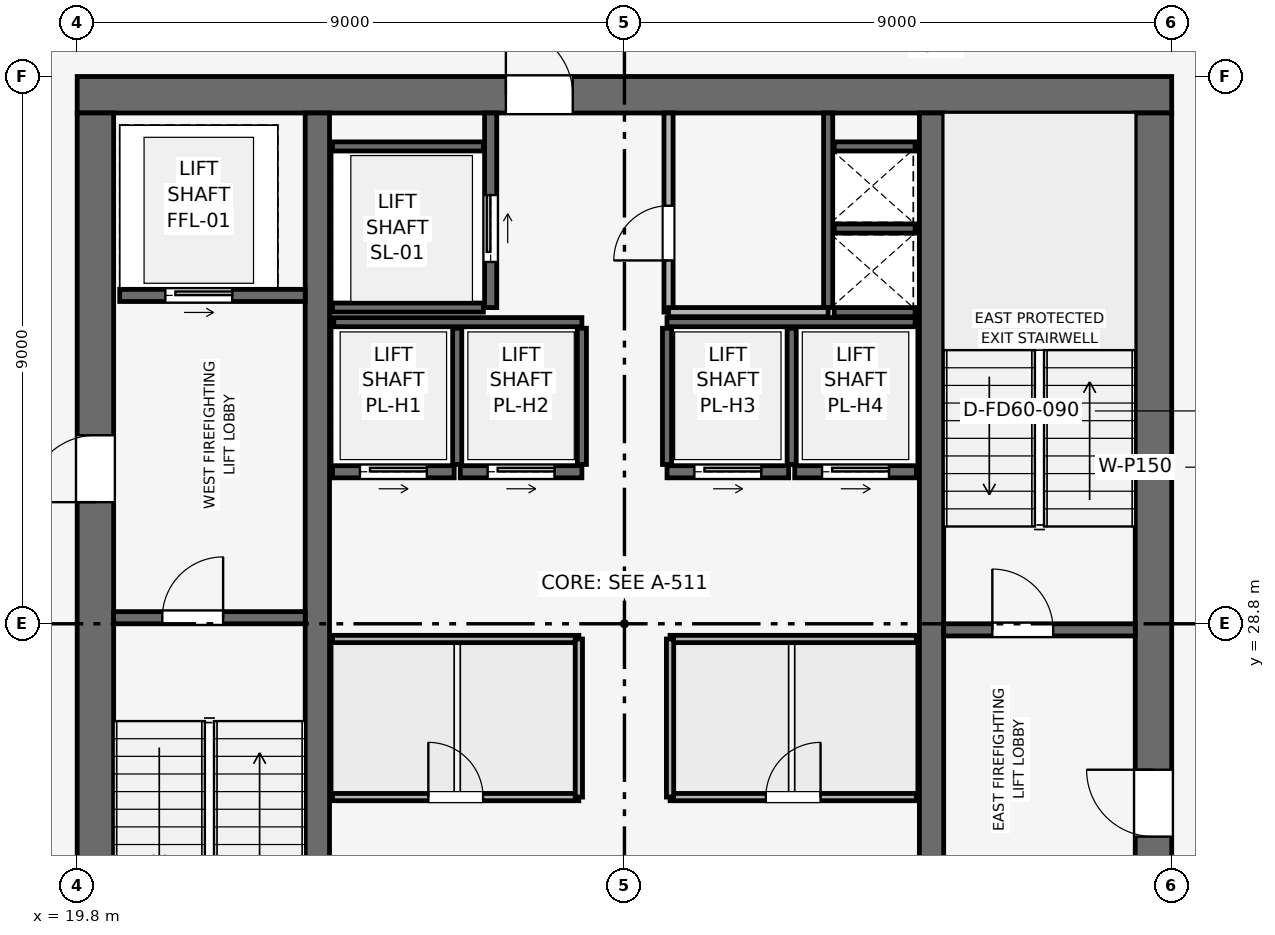
"""IFC4 building model, lengths in metres.
Left out: names, types, materials, properties, quantities, classifications, styles, units other than length and angle.
Written with IfcOpenShell. Run it as: python <this file> out.ifc"""

import sys

from ifc_helpers import new_model, si_unit, direction, frame, frame_2d, origin, place, context, subcontext, project, spatial, rectangle, extrude, element, fill, save


model = new_model("IFC4")
c1 = context("Model", 3, precision=1e-05, world=origin(), true_north=direction((0.0, 1.0)))
c2 = subcontext(c1, "Body", "Model", "MODEL_VIEW")
j1 = project(units=[si_unit("LENGTHUNIT", "METRE"), si_unit("PLANEANGLEUNIT", "RADIAN")], contexts=[c1])
p1 = place(None, origin())
s1 = spatial("IfcSite", under=j1, at=p1, CompositionType="ELEMENT")
p2 = place(p1, origin())
s2 = spatial("IfcBuilding", under=s1, at=p2, CompositionType="ELEMENT")
p3 = place(p2, frame((0.0, 0.0, 310.5)))
s3 = spatial("IfcBuildingStorey", under=s2, at=p3, CompositionType="ELEMENT", Elevation=310.5)
p4 = place(p3, frame((19.8, 37.5, 0.0), z_axis=(0.0, 0.0, 1.0), x_axis=(1.0, 0.0, 0.0)))
e1 = element("IfcWall", 1, at=p4, inside=s3, PredefinedType="SHEAR", context=c2, shape_type="SweptSolid", body=[
    extrude(rectangle(XDim=18.0, YDim=0.6, at=frame_2d((9.0, 0.0))), origin(), (0.0, 0.0, 1.0), 3.75),
])
p5 = place(p4, frame((7.05, 0.0, 0.0)))
e2 = element("IfcOpeningElement", 2, at=p5, cuts=e1, PredefinedType="OPENING", context=c2, shape_type="SweptSolid", body=[
    extrude(rectangle(XDim=1.1, YDim=2.15, at=frame_2d((0.55, 1.075))), frame((0.0, 0.31, 0.0), z_axis=(0.0, -1.0, 0.0), x_axis=(1.0, 0.0, 0.0)), (0.0, 0.0, 1.0), 0.62),
])
p6 = place(p3, frame((20.1, 20.4, 0.0), z_axis=(0.0, 0.0, 1.0), x_axis=(0.0, 1.0, 0.0)))
e3 = element("IfcWall", 3, at=p6, inside=s3, PredefinedType="SHEAR", context=c2, shape_type="SweptSolid", body=[
    extrude(rectangle(XDim=16.8, YDim=0.6, at=frame_2d((8.4, 0.0))), origin(), (0.0, 0.0, 1.0), 3.75),
])
p7 = place(p6, frame((10.4, 0.0, 0.0)))
e4 = element("IfcOpeningElement", 4, at=p7, cuts=e3, PredefinedType="OPENING", context=c2, shape_type="SweptSolid", body=[
    extrude(rectangle(XDim=1.1, YDim=2.15, at=frame_2d((0.55, 1.075))), frame((0.0, 0.31, 0.0), z_axis=(0.0, -1.0, 0.0), x_axis=(1.0, 0.0, 0.0)), (0.0, 0.0, 1.0), 0.62),
])
p8 = place(p3, frame((37.5, 20.4, 0.0), z_axis=(0.0, 0.0, 1.0), x_axis=(0.0, 1.0, 0.0)))
e5 = element("IfcWall", 5, at=p8, inside=s3, PredefinedType="SHEAR", context=c2, shape_type="SweptSolid", body=[
    extrude(rectangle(XDim=16.8, YDim=0.6, at=frame_2d((8.4, 0.0))), origin(), (0.0, 0.0, 1.0), 3.75),
])
p9 = place(p8, frame((4.9, 0.0, 0.0)))
e6 = element("IfcOpeningElement", 6, at=p9, cuts=e5, PredefinedType="OPENING", context=c2, shape_type="SweptSolid", body=[
    extrude(rectangle(XDim=1.1, YDim=2.15, at=frame_2d((0.55, 1.075))), frame((0.0, 0.31, 0.0), z_axis=(0.0, -1.0, 0.0), x_axis=(1.0, 0.0, 0.0)), (0.0, 0.0, 1.0), 0.62),
])
for number, where, z_axis, x_axis in (
    (7, (23.75, 20.4, 0.0), (0.0, 0.0, 1.0), (0.0, 1.0, 0.0)),
    (8, (33.85, 20.4, 0.0), (0.0, 0.0, 1.0), (0.0, 1.0, 0.0)),
):
    element("IfcWall", number, at=place(p3, frame(where, z_axis=z_axis, x_axis=x_axis)), inside=s3, PredefinedType="SHEAR", context=c2, shape_type="SweptSolid", body=[
        extrude(rectangle(XDim=16.8, YDim=0.4, at=frame_2d((8.4, 0.0))), origin(), (0.0, 0.0, 1.0), 3.75),
    ])
p10 = place(p3, frame((20.4, 28.9, 0.0), z_axis=(0.0, 0.0, 1.0), x_axis=(1.0, 0.0, 0.0)))
e9 = element("IfcWall", 9, at=p10, inside=s3, PredefinedType="SHEAR", context=c2, shape_type="SweptSolid", body=[
    extrude(rectangle(XDim=3.15, YDim=0.2, at=frame_2d((1.575, 0.0))), origin(), (0.0, 0.0, 1.0), 3.51),
])
p11 = place(p10, frame((0.8, 0.0, 0.0)))
e10 = element("IfcOpeningElement", 10, at=p11, cuts=e9, PredefinedType="OPENING", context=c2, shape_type="SweptSolid", body=[
    extrude(rectangle(XDim=1.0, YDim=2.1, at=frame_2d((0.5, 1.05))), frame((0.0, 0.11, 0.0), z_axis=(0.0, -1.0, 0.0), x_axis=(1.0, 0.0, 0.0)), (0.0, 0.0, 1.0), 0.22),
])
p12 = place(p3, frame((34.05, 28.7, 0.0), z_axis=(0.0, 0.0, 1.0), x_axis=(1.0, 0.0, 0.0)))
e11 = element("IfcWall", 11, at=p12, inside=s3, PredefinedType="SHEAR", context=c2, shape_type="SweptSolid", body=[
    extrude(rectangle(XDim=3.15, YDim=0.2, at=frame_2d((1.575, 0.0))), origin(), (0.0, 0.0, 1.0), 3.51),
])
p13 = place(p12, frame((0.8, 0.0, 0.0)))
e12 = element("IfcOpeningElement", 12, at=p13, cuts=e11, PredefinedType="OPENING", context=c2, shape_type="SweptSolid", body=[
    extrude(rectangle(XDim=1.0, YDim=2.1, at=frame_2d((0.5, 1.05))), frame((0.0, 0.11, 0.0), z_axis=(0.0, -1.0, 0.0), x_axis=(1.0, 0.0, 0.0)), (0.0, 0.0, 1.0), 0.22),
])
p14 = place(p3, frame((32.15, 34.0, 0.0), z_axis=(0.0, 0.0, 1.0), x_axis=(0.0, 1.0, 0.0)))
e13 = element("IfcWall", 13, at=p14, inside=s3, PredefinedType="SHEAR", context=c2, shape_type="SweptSolid", body=[
    extrude(rectangle(XDim=3.2, YDim=0.15, at=frame_2d((1.6, 0.0))), origin(), (0.0, 0.0, 1.0), 3.51),
])
for number, where, z_axis, x_axis in (
    (14, (32.25, 33.925, 0.0), (0.0, 0.0, 1.0), (1.0, 0.0, 0.0)),
    (15, (32.25, 35.3, 0.0), (0.0, 0.0, 1.0), (1.0, 0.0, 0.0)),
):
    element("IfcWall", number, at=place(p3, frame(where, z_axis=z_axis, x_axis=x_axis)), inside=s3, PredefinedType="SHEAR", context=c2, shape_type="SweptSolid", body=[
        extrude(rectangle(XDim=1.33, YDim=0.15, at=frame_2d((0.665, 0.0))), origin(), (0.0, 0.0, 1.0), 3.51),
    ])
p15 = place(p3, frame((20.5, 34.2, 0.0), z_axis=(0.0, 0.0, 1.0), x_axis=(1.0, 0.0, 0.0)))
e16 = element("IfcWall", 16, at=p15, inside=s3, PredefinedType="SHEAR", context=c2, shape_type="SweptSolid", body=[
    extrude(rectangle(XDim=3.05, YDim=0.2, at=frame_2d((1.525, 0.0))), origin(), (0.0, 0.0, 1.0), 3.51),
])
p16 = place(p15, frame((0.75, 0.0, 0.0)))
e17 = element("IfcOpeningElement", 17, at=p16, cuts=e16, PredefinedType="OPENING", context=c2, shape_type="SweptSolid", body=[
    extrude(rectangle(XDim=1.1, YDim=2.15, at=frame_2d((0.55, 1.075))), frame((0.0, 0.11, 0.0), z_axis=(0.0, -1.0, 0.0), x_axis=(1.0, 0.0, 0.0)), (0.0, 0.0, 1.0), 0.22),
])
p17 = place(p3, frame((26.6, 34.0, 0.0), z_axis=(0.0, 0.0, 1.0), x_axis=(0.0, 1.0, 0.0)))
e18 = element("IfcWall", 18, at=p17, inside=s3, PredefinedType="SHEAR", context=c2, shape_type="SweptSolid", body=[
    extrude(rectangle(XDim=3.2, YDim=0.2, at=frame_2d((1.6, 0.0))), origin(), (0.0, 0.0, 1.0), 3.51),
])
p18 = place(p17, frame((0.75, 0.0, 0.0)))
e19 = element("IfcOpeningElement", 19, at=p18, cuts=e18, PredefinedType="OPENING", context=c2, shape_type="SweptSolid", body=[
    extrude(rectangle(XDim=1.1, YDim=2.15, at=frame_2d((0.55, 1.075))), frame((0.0, 0.11, 0.0), z_axis=(0.0, -1.0, 0.0), x_axis=(1.0, 0.0, 0.0)), (0.0, 0.0, 1.0), 0.22),
])
for number, where, z_axis, x_axis in (
    (20, (24.0, 34.0, 0.0), (0.0, 0.0, 1.0), (1.0, 0.0, 0.0)),
    (21, (24.0, 36.65, 0.0), (0.0, 0.0, 1.0), (1.0, 0.0, 0.0)),
):
    element("IfcWall", number, at=place(p3, frame(where, z_axis=z_axis, x_axis=x_axis)), inside=s3, PredefinedType="SHEAR", context=c2, shape_type="SweptSolid", body=[
        extrude(rectangle(XDim=2.48, YDim=0.15, at=frame_2d((1.24, 0.0))), origin(), (0.0, 0.0, 1.0), 3.51),
    ])
p19 = place(p3, frame((24.0, 31.3, 0.0), z_axis=(0.0, 0.0, 1.0), x_axis=(1.0, 0.0, 0.0)))
e22 = element("IfcWall", 22, at=p19, inside=s3, PredefinedType="SHEAR", context=c2, shape_type="SweptSolid", body=[
    extrude(rectangle(XDim=2.0, YDim=0.2, at=frame_2d((1.0, 0.0))), origin(), (0.0, 0.0, 1.0), 3.51),
])
p20 = place(p19, frame((0.45, 0.0, 0.0)))
e23 = element("IfcOpeningElement", 23, at=p20, cuts=e22, PredefinedType="OPENING", context=c2, shape_type="SweptSolid", body=[
    extrude(rectangle(XDim=1.1, YDim=2.15, at=frame_2d((0.55, 1.075))), frame((0.0, 0.11, 0.0), z_axis=(0.0, -1.0, 0.0), x_axis=(1.0, 0.0, 0.0)), (0.0, 0.0, 1.0), 0.22),
])
p21 = place(p3, frame((26.1, 31.3, 0.0), z_axis=(0.0, 0.0, 1.0), x_axis=(1.0, 0.0, 0.0)))
e24 = element("IfcWall", 24, at=p21, inside=s3, PredefinedType="SHEAR", context=c2, shape_type="SweptSolid", body=[
    extrude(rectangle(XDim=2.0, YDim=0.2, at=frame_2d((1.0, 0.0))), origin(), (0.0, 0.0, 1.0), 3.51),
])
p22 = place(p21, frame((0.45, 0.0, 0.0)))
e25 = element("IfcOpeningElement", 25, at=p22, cuts=e24, PredefinedType="OPENING", context=c2, shape_type="SweptSolid", body=[
    extrude(rectangle(XDim=1.1, YDim=2.15, at=frame_2d((0.55, 1.075))), frame((0.0, 0.11, 0.0), z_axis=(0.0, -1.0, 0.0), x_axis=(1.0, 0.0, 0.0)), (0.0, 0.0, 1.0), 0.22),
])
p23 = place(p3, frame((29.5, 31.3, 0.0), z_axis=(0.0, 0.0, 1.0), x_axis=(1.0, 0.0, 0.0)))
e26 = element("IfcWall", 26, at=p23, inside=s3, PredefinedType="SHEAR", context=c2, shape_type="SweptSolid", body=[
    extrude(rectangle(XDim=2.0, YDim=0.2, at=frame_2d((1.0, 0.0))), origin(), (0.0, 0.0, 1.0), 3.51),
])
p24 = place(p23, frame((0.45, 0.0, 0.0)))
e27 = element("IfcOpeningElement", 27, at=p24, cuts=e26, PredefinedType="OPENING", context=c2, shape_type="SweptSolid", body=[
    extrude(rectangle(XDim=1.1, YDim=2.15, at=frame_2d((0.55, 1.075))), frame((0.0, 0.11, 0.0), z_axis=(0.0, -1.0, 0.0), x_axis=(1.0, 0.0, 0.0)), (0.0, 0.0, 1.0), 0.22),
])
p25 = place(p3, frame((31.6, 31.3, 0.0), z_axis=(0.0, 0.0, 1.0), x_axis=(1.0, 0.0, 0.0)))
e28 = element("IfcWall", 28, at=p25, inside=s3, PredefinedType="SHEAR", context=c2, shape_type="SweptSolid", body=[
    extrude(rectangle(XDim=2.0, YDim=0.2, at=frame_2d((1.0, 0.0))), origin(), (0.0, 0.0, 1.0), 3.51),
])
p26 = place(p25, frame((0.45, 0.0, 0.0)))
e29 = element("IfcOpeningElement", 29, at=p26, cuts=e28, PredefinedType="OPENING", context=c2, shape_type="SweptSolid", body=[
    extrude(rectangle(XDim=1.1, YDim=2.15, at=frame_2d((0.55, 1.075))), frame((0.0, 0.11, 0.0), z_axis=(0.0, -1.0, 0.0), x_axis=(1.0, 0.0, 0.0)), (0.0, 0.0, 1.0), 0.22),
])
p27 = place(p3, frame((32.25, 36.65, 0.0), z_axis=(0.0, 0.0, 1.0), x_axis=(1.0, 0.0, 0.0)))
e30 = element("IfcWall", 30, at=p27, inside=s3, PredefinedType="SHEAR", context=c2, shape_type="SweptSolid", body=[
    extrude(rectangle(XDim=1.33, YDim=0.15, at=frame_2d((0.665, 0.0))), origin(), (0.0, 0.0, 1.0), 3.51),
])
for number, where, z_axis, x_axis in (
    (31, (24.02, 33.76, 0.0), (0.0, 0.0, 1.0), (1.0, 0.0, 0.0)),
    (32, (29.5, 33.76, 0.0), (0.0, 0.0, 1.0), (1.0, 0.0, 0.0)),
):
    element("IfcWall", number, at=place(p3, frame(where, z_axis=z_axis, x_axis=x_axis)), inside=s3, PredefinedType="SHEAR", context=c2, shape_type="SweptSolid", body=[
        extrude(rectangle(XDim=4.08, YDim=0.15, at=frame_2d((2.04, 0.0))), origin(), (0.0, 0.0, 1.0), 3.51),
    ])
for number, where, z_axis, x_axis in (
    (33, (26.05, 31.42, 0.0), (0.0, 0.0, 1.0), (0.0, 1.0, 0.0)),
    (34, (28.1, 31.42, 0.0), (0.0, 0.0, 1.0), (0.0, 1.0, 0.0)),
    (35, (29.5, 31.42, 0.0), (0.0, 0.0, 1.0), (0.0, 1.0, 0.0)),
    (36, (31.55, 31.42, 0.0), (0.0, 0.0, 1.0), (0.0, 1.0, 0.0)),
):
    element("IfcWall", number, at=place(p3, frame(where, z_axis=z_axis, x_axis=x_axis)), inside=s3, PredefinedType="SHEAR", context=c2, shape_type="SweptSolid", body=[
        extrude(rectangle(XDim=2.24, YDim=0.15, at=frame_2d((1.12, 0.0))), origin(), (0.0, 0.0, 1.0), 3.51),
    ])
p28 = place(p3, frame((29.525, 33.925, 0.0), z_axis=(0.0, 0.0, 1.0), x_axis=(0.0, 1.0, 0.0)))
e37 = element("IfcWall", 37, at=p28, inside=s3, PredefinedType="PARTITIONING", context=c2, shape_type="SweptSolid", body=[
    extrude(rectangle(XDim=3.275, YDim=0.15, at=frame_2d((1.637, 0.0))), origin(), (0.0, 0.0, 1.0), 3.51),
])
p29 = place(p28, frame((0.85, 0.0, 0.0)))
e38 = element("IfcOpeningElement", 38, at=p29, cuts=e37, PredefinedType="OPENING", context=c2, shape_type="SweptSolid", body=[
    extrude(rectangle(XDim=0.9, YDim=2.1, at=frame_2d((0.45, 1.05))), frame((0.0, 0.085, 0.0), z_axis=(0.0, -1.0, 0.0), x_axis=(1.0, 0.0, 0.0)), (0.0, 0.0, 1.0), 0.17),
])
p30 = place(p3, frame((29.525, 33.925, 0.0), z_axis=(0.0, 0.0, 1.0), x_axis=(1.0, 0.0, 0.0)))
e39 = element("IfcWall", 39, at=p30, inside=s3, PredefinedType="PARTITIONING", context=c2, shape_type="SweptSolid", body=[
    extrude(rectangle(XDim=2.625, YDim=0.15, at=frame_2d((1.312, 0.0))), origin(), (0.0, 0.0, 1.0), 3.51),
])
p31 = place(p3, frame((24.0, 25.95, 0.0), z_axis=(0.0, 0.0, 1.0), x_axis=(1.0, 0.0, 0.0)))
e40 = element("IfcWall", 40, at=p31, inside=s3, PredefinedType="PARTITIONING", context=c2, shape_type="SweptSolid", body=[
    extrude(rectangle(XDim=4.05, YDim=0.12, at=frame_2d((2.025, 0.0))), origin(), (0.0, 0.0, 1.0), 3.51),
])
p32 = place(p31, frame((1.575, 0.0, 0.0)))
e41 = element("IfcOpeningElement", 41, at=p32, cuts=e40, PredefinedType="OPENING", context=c2, shape_type="SweptSolid", body=[
    extrude(rectangle(XDim=0.9, YDim=2.1, at=frame_2d((0.45, 1.05))), frame((0.0, 0.07, 0.0), z_axis=(0.0, -1.0, 0.0), x_axis=(1.0, 0.0, 0.0)), (0.0, 0.0, 1.0), 0.14),
])
p33 = place(p3, frame((24.0, 28.55, 0.0), z_axis=(0.0, 0.0, 1.0), x_axis=(1.0, 0.0, 0.0)))
e42 = element("IfcWall", 42, at=p33, inside=s3, PredefinedType="PARTITIONING", context=c2, shape_type="SweptSolid", body=[
    extrude(rectangle(XDim=4.05, YDim=0.12, at=frame_2d((2.025, 0.0))), origin(), (0.0, 0.0, 1.0), 3.51),
])
p34 = place(p3, frame((28.05, 25.95, 0.0), z_axis=(0.0, 0.0, 1.0), x_axis=(0.0, 1.0, 0.0)))
e43 = element("IfcWall", 43, at=p34, inside=s3, PredefinedType="PARTITIONING", context=c2, shape_type="SweptSolid", body=[
    extrude(rectangle(XDim=2.6, YDim=0.12, at=frame_2d((1.3, 0.0))), origin(), (0.0, 0.0, 1.0), 3.51),
])
p35 = place(p3, frame((29.55, 25.95, 0.0), z_axis=(0.0, 0.0, 1.0), x_axis=(1.0, 0.0, 0.0)))
e44 = element("IfcWall", 44, at=p35, inside=s3, PredefinedType="PARTITIONING", context=c2, shape_type="SweptSolid", body=[
    extrude(rectangle(XDim=4.05, YDim=0.12, at=frame_2d((2.025, 0.0))), origin(), (0.0, 0.0, 1.0), 3.51),
])
p36 = place(p35, frame((1.575, 0.0, 0.0)))
e45 = element("IfcOpeningElement", 45, at=p36, cuts=e44, PredefinedType="OPENING", context=c2, shape_type="SweptSolid", body=[
    extrude(rectangle(XDim=0.9, YDim=2.1, at=frame_2d((0.45, 1.05))), frame((0.0, 0.07, 0.0), z_axis=(0.0, -1.0, 0.0), x_axis=(1.0, 0.0, 0.0)), (0.0, 0.0, 1.0), 0.14),
])
p37 = place(p3, frame((29.55, 28.55, 0.0), z_axis=(0.0, 0.0, 1.0), x_axis=(1.0, 0.0, 0.0)))
e46 = element("IfcWall", 46, at=p37, inside=s3, PredefinedType="PARTITIONING", context=c2, shape_type="SweptSolid", body=[
    extrude(rectangle(XDim=4.05, YDim=0.12, at=frame_2d((2.025, 0.0))), origin(), (0.0, 0.0, 1.0), 3.51),
])
p38 = place(p3, frame((29.55, 25.95, 0.0), z_axis=(0.0, 0.0, 1.0), x_axis=(0.0, 1.0, 0.0)))
e47 = element("IfcWall", 47, at=p38, inside=s3, PredefinedType="PARTITIONING", context=c2, shape_type="SweptSolid", body=[
    extrude(rectangle(XDim=2.6, YDim=0.12, at=frame_2d((1.3, 0.0))), origin(), (0.0, 0.0, 1.0), 3.51),
])
p39 = place(p11, origin())
e48 = element("IfcDoor", 48, at=p39, inside=s3, OperationType="SINGLE_SWING_RIGHT", PredefinedType="DOOR", context=c2, shape_type="SweptSolid", body=[
    extrude(rectangle(XDim=1.0, YDim=2.1, at=frame_2d((0.5, 1.05))), frame((0.0, 0.025, 0.0), z_axis=(0.0, -1.0, 0.0), x_axis=(1.0, 0.0, 0.0)), (0.0, 0.0, 1.0), 0.05),
])
fill(e10, e48)
p40 = place(p13, origin())
e49 = element("IfcDoor", 49, at=p40, inside=s3, OperationType="SINGLE_SWING_LEFT", PredefinedType="DOOR", context=c2, shape_type="SweptSolid", body=[
    extrude(rectangle(XDim=1.0, YDim=2.1, at=frame_2d((0.5, 1.05))), frame((0.0, 0.025, 0.0), z_axis=(0.0, -1.0, 0.0), x_axis=(1.0, 0.0, 0.0)), (0.0, 0.0, 1.0), 0.05),
])
fill(e12, e49)
p41 = place(p16, origin())
e50 = element("IfcDoor", 50, at=p41, inside=s3, OperationType="SLIDING_TO_RIGHT", PredefinedType="DOOR", context=c2, shape_type="SweptSolid", body=[
    extrude(rectangle(XDim=1.1, YDim=2.15, at=frame_2d((0.55, 1.075))), frame((0.0, 0.025, 0.0), z_axis=(0.0, -1.0, 0.0), x_axis=(1.0, 0.0, 0.0)), (0.0, 0.0, 1.0), 0.05),
])
fill(e17, e50)
p42 = place(p18, origin())
e51 = element("IfcDoor", 51, at=p42, inside=s3, OperationType="SLIDING_TO_RIGHT", PredefinedType="DOOR", context=c2, shape_type="SweptSolid", body=[
    extrude(rectangle(XDim=1.1, YDim=2.15, at=frame_2d((0.55, 1.075))), frame((0.0, 0.025, 0.0), z_axis=(0.0, -1.0, 0.0), x_axis=(1.0, 0.0, 0.0)), (0.0, 0.0, 1.0), 0.05),
])
fill(e19, e51)
p43 = place(p20, origin())
e52 = element("IfcDoor", 52, at=p43, inside=s3, OperationType="SLIDING_TO_RIGHT", PredefinedType="DOOR", context=c2, shape_type="SweptSolid", body=[
    extrude(rectangle(XDim=1.1, YDim=2.15, at=frame_2d((0.55, 1.075))), frame((0.0, 0.025, 0.0), z_axis=(0.0, -1.0, 0.0), x_axis=(1.0, 0.0, 0.0)), (0.0, 0.0, 1.0), 0.05),
])
fill(e23, e52)
p44 = place(p22, origin())
e53 = element("IfcDoor", 53, at=p44, inside=s3, OperationType="SLIDING_TO_RIGHT", PredefinedType="DOOR", context=c2, shape_type="SweptSolid", body=[
    extrude(rectangle(XDim=1.1, YDim=2.15, at=frame_2d((0.55, 1.075))), frame((0.0, 0.025, 0.0), z_axis=(0.0, -1.0, 0.0), x_axis=(1.0, 0.0, 0.0)), (0.0, 0.0, 1.0), 0.05),
])
fill(e25, e53)
p45 = place(p24, origin())
e54 = element("IfcDoor", 54, at=p45, inside=s3, OperationType="SLIDING_TO_RIGHT", PredefinedType="DOOR", context=c2, shape_type="SweptSolid", body=[
    extrude(rectangle(XDim=1.1, YDim=2.15, at=frame_2d((0.55, 1.075))), frame((0.0, 0.025, 0.0), z_axis=(0.0, -1.0, 0.0), x_axis=(1.0, 0.0, 0.0)), (0.0, 0.0, 1.0), 0.05),
])
fill(e27, e54)
p46 = place(p26, origin())
e55 = element("IfcDoor", 55, at=p46, inside=s3, OperationType="SLIDING_TO_RIGHT", PredefinedType="DOOR", context=c2, shape_type="SweptSolid", body=[
    extrude(rectangle(XDim=1.1, YDim=2.15, at=frame_2d((0.55, 1.075))), frame((0.0, 0.025, 0.0), z_axis=(0.0, -1.0, 0.0), x_axis=(1.0, 0.0, 0.0)), (0.0, 0.0, 1.0), 0.05),
])
fill(e29, e55)
p47 = place(p29, origin())
e56 = element("IfcDoor", 56, at=p47, inside=s3, OperationType="SINGLE_SWING_LEFT", PredefinedType="DOOR", context=c2, shape_type="SweptSolid", body=[
    extrude(rectangle(XDim=0.9, YDim=2.1, at=frame_2d((0.45, 1.05))), frame((0.0, 0.025, 0.0), z_axis=(0.0, -1.0, 0.0), x_axis=(1.0, 0.0, 0.0)), (0.0, 0.0, 1.0), 0.05),
])
fill(e38, e56)
p48 = place(p32, origin())
e57 = element("IfcDoor", 57, at=p48, inside=s3, OperationType="SINGLE_SWING_LEFT", PredefinedType="DOOR", context=c2, shape_type="SweptSolid", body=[
    extrude(rectangle(XDim=0.9, YDim=2.1, at=frame_2d((0.45, 1.05))), frame((0.0, 0.025, 0.0), z_axis=(0.0, -1.0, 0.0), x_axis=(1.0, 0.0, 0.0)), (0.0, 0.0, 1.0), 0.05),
])
fill(e41, e57)
p49 = place(p36, origin())
e58 = element("IfcDoor", 58, at=p49, inside=s3, OperationType="SINGLE_SWING_RIGHT", PredefinedType="DOOR", context=c2, shape_type="SweptSolid", body=[
    extrude(rectangle(XDim=0.9, YDim=2.1, at=frame_2d((0.45, 1.05))), frame((0.0, 0.025, 0.0), z_axis=(0.0, -1.0, 0.0), x_axis=(1.0, 0.0, 0.0)), (0.0, 0.0, 1.0), 0.05),
])
fill(e45, e58)
p50 = place(p7, origin())
e59 = element("IfcDoor", 59, at=p50, inside=s3, OperationType="SINGLE_SWING_LEFT", PredefinedType="DOOR", context=c2, shape_type="SweptSolid", body=[
    extrude(rectangle(XDim=1.1, YDim=2.15, at=frame_2d((0.55, 1.075))), frame((0.0, 0.025, 0.0), z_axis=(0.0, -1.0, 0.0), x_axis=(1.0, 0.0, 0.0)), (0.0, 0.0, 1.0), 0.05),
])
fill(e4, e59)
p51 = place(p9, origin())
e60 = element("IfcDoor", 60, at=p51, inside=s3, OperationType="SINGLE_SWING_RIGHT", PredefinedType="DOOR", context=c2, shape_type="SweptSolid", body=[
    extrude(rectangle(XDim=1.1, YDim=2.15, at=frame_2d((0.55, 1.075))), frame((0.0, 0.025, 0.0), z_axis=(0.0, -1.0, 0.0), x_axis=(1.0, 0.0, 0.0)), (0.0, 0.0, 1.0), 0.05),
])
fill(e6, e60)
p52 = place(p5, origin())
e61 = element("IfcDoor", 61, at=p52, inside=s3, OperationType="SINGLE_SWING_LEFT", PredefinedType="DOOR", context=c2, shape_type="SweptSolid", body=[
    extrude(rectangle(XDim=1.1, YDim=2.15, at=frame_2d((0.55, 1.075))), frame((0.0, 0.025, 0.0), z_axis=(0.0, -1.0, 0.0), x_axis=(1.0, 0.0, 0.0)), (0.0, 0.0, 1.0), 0.05),
])
fill(e2, e61)
save(model, sys.argv[1])
